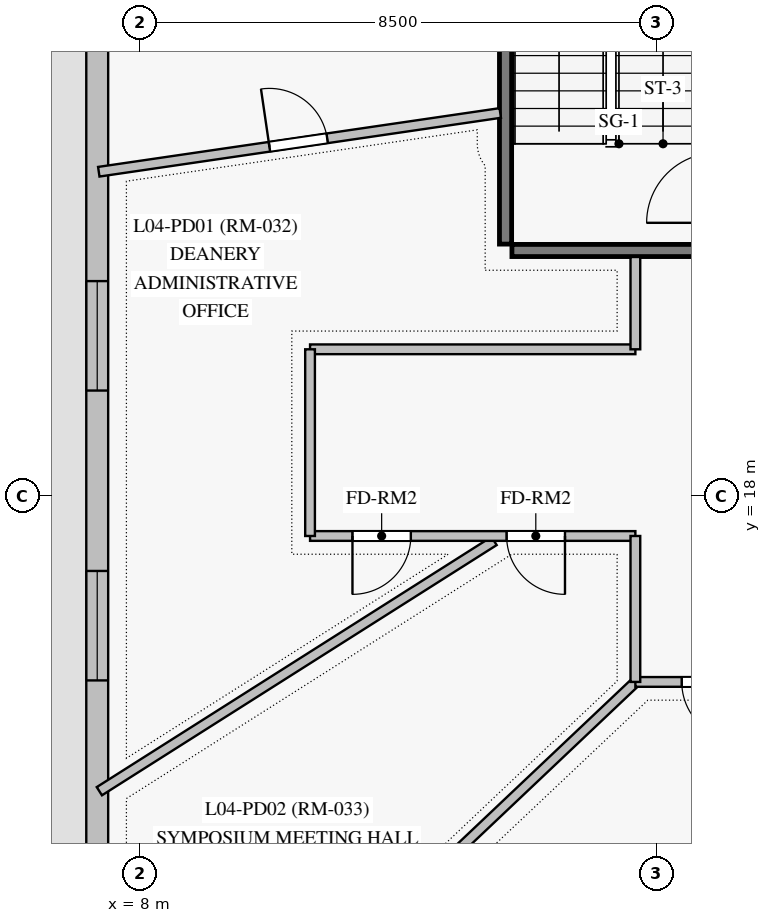
"""IFC4 building model, lengths in metres.
Left out: names, types, materials, properties, quantities, classifications, styles, units other than length and angle.
Written with IfcOpenShell. Run it as: python <this file> out.ifc"""

import sys

from ifc_helpers import new_model, si_unit, direction, frame, frame_2d, origin, origin_with_axes, place, context, subcontext, project, spatial, rectangle, extrude, source, transform, mapped, element, fill, save


model = new_model("IFC4")
c1 = context("Model", 3, precision=1e-05, world=origin(), true_north=direction((0.0, 1.0)))
c2 = subcontext(c1, "Body", "Model", "MODEL_VIEW")
j1 = project(units=[si_unit("LENGTHUNIT", "METRE"), si_unit("PLANEANGLEUNIT", "RADIAN")], contexts=[c1])
p1 = place(None, origin())
s1 = spatial("IfcSite", under=j1, at=p1, CompositionType="ELEMENT")
p2 = place(p1, origin())
s2 = spatial("IfcBuilding", under=s1, at=p2, CompositionType="ELEMENT")
p3 = place(p2, frame((0.0, 0.0, 18.0)))
s3 = spatial("IfcBuildingStorey", under=s2, at=p3, CompositionType="ELEMENT", Elevation=18.0)
p4 = place(p3, frame((7.3, 45.8, 0.0), z_axis=(0.0, 0.0, 1.0), x_axis=(0.0, -1.0, 0.0)))
e1 = element("IfcWall", 1, at=p4, inside=s3, PredefinedType="SOLIDWALL", context=c2, shape_type="SweptSolid", body=[
    extrude(rectangle(XDim=38.6, YDim=0.36, at=frame_2d((19.3, 0.0))), origin(), (0.0, 0.0, 1.0), 4.225),
])
p5 = place(p4, frame((0.817, 0.0, 0.85)))
e2 = element("IfcOpeningElement", 2, at=p5, cuts=e1, PredefinedType="OPENING", context=c2, shape_type="SweptSolid", body=[
    extrude(rectangle(XDim=1.8, YDim=2.2, at=frame_2d((0.9, 1.1))), frame((0.0, 0.19, 0.0), z_axis=(0.0, -1.0, 0.0), x_axis=(1.0, 0.0, 0.0)), (0.0, 0.0, 1.0), 0.38),
])
p6 = place(p4, frame((12.849, 0.0, 0.85)))
e3 = element("IfcOpeningElement", 3, at=p6, cuts=e1, PredefinedType="OPENING", context=c2, shape_type="SweptSolid", body=[
    extrude(rectangle(XDim=1.8, YDim=2.2, at=frame_2d((0.9, 1.1))), frame((0.0, 0.19, 0.0), z_axis=(0.0, -1.0, 0.0), x_axis=(1.0, 0.0, 0.0)), (0.0, 0.0, 1.0), 0.38),
])
p7 = place(p4, frame((18.439, 0.0, 0.85)))
e4 = element("IfcOpeningElement", 4, at=p7, cuts=e1, PredefinedType="OPENING", context=c2, shape_type="SweptSolid", body=[
    extrude(rectangle(XDim=1.8, YDim=2.2, at=frame_2d((0.9, 1.1))), frame((0.0, 0.19, 0.0), z_axis=(0.0, -1.0, 0.0), x_axis=(1.0, 0.0, 0.0)), (0.0, 0.0, 1.0), 0.38),
])
p8 = place(p4, frame((24.258, 0.0, 0.85)))
e5 = element("IfcOpeningElement", 5, at=p8, cuts=e1, PredefinedType="OPENING", context=c2, shape_type="SweptSolid", body=[
    extrude(rectangle(XDim=1.8, YDim=2.2, at=frame_2d((0.9, 1.1))), frame((0.0, 0.19, 0.0), z_axis=(0.0, -1.0, 0.0), x_axis=(1.0, 0.0, 0.0)), (0.0, 0.0, 1.0), 0.38),
])
p9 = place(p4, frame((29.025, 0.0, 0.85)))
e6 = element("IfcOpeningElement", 6, at=p9, cuts=e1, PredefinedType="OPENING", context=c2, shape_type="SweptSolid", body=[
    extrude(rectangle(XDim=1.8, YDim=2.2, at=frame_2d((0.9, 1.1))), frame((0.0, 0.19, 0.0), z_axis=(0.0, -1.0, 0.0), x_axis=(1.0, 0.0, 0.0)), (0.0, 0.0, 1.0), 0.38),
])
p10 = place(p4, frame((34.599, 0.0, 0.85)))
e7 = element("IfcOpeningElement", 7, at=p10, cuts=e1, PredefinedType="OPENING", context=c2, shape_type="SweptSolid", body=[
    extrude(rectangle(XDim=1.8, YDim=2.2, at=frame_2d((0.9, 1.1))), frame((0.0, 0.19, 0.0), z_axis=(0.0, -1.0, 0.0), x_axis=(1.0, 0.0, 0.0)), (0.0, 0.0, 1.0), 0.38),
])
p11 = place(p4, frame((5.908, 0.0, 0.0)))
e8 = element("IfcOpeningElement", 8, at=p11, cuts=e1, PredefinedType="OPENING", context=c2, shape_type="SweptSolid", body=[
    extrude(rectangle(XDim=1.05, YDim=2.12, at=frame_2d((0.525, 1.06))), frame((0.0, 0.19, 0.0), z_axis=(0.0, -1.0, 0.0), x_axis=(1.0, 0.0, 0.0)), (0.0, 0.0, 1.0), 0.38),
])
p12 = place(p3, frame((14.015, 22.15, 0.0), z_axis=(0.0, 0.0, 1.0), x_axis=(0.0, 1.0, 0.0)))
e9 = element("IfcWall", 9, at=p12, inside=s3, PredefinedType="SHEAR", context=c2, shape_type="SweptSolid", body=[
    extrude(rectangle(XDim=7.35, YDim=0.2, at=frame_2d((3.675, 0.0))), origin(), (0.0, 0.0, 1.0), 4.225),
])
p13 = place(p3, frame((14.12, 22.045, 0.0), z_axis=(0.0, 0.0, 1.0), x_axis=(1.0, 0.0, 0.0)))
e10 = element("IfcWall", 10, at=p13, inside=s3, PredefinedType="SHEAR", context=c2, shape_type="SweptSolid", body=[
    extrude(rectangle(XDim=3.26, YDim=0.2, at=frame_2d((1.63, 0.0))), origin(), (0.0, 0.0, 1.0), 4.225),
])
p14 = place(p3, frame((19.64, 14.868, 0.0), z_axis=(0.0, 0.0, 1.0), x_axis=(-0.602693961027, -0.797972423923, 0.0)))
e11 = element("IfcWall", 11, at=p14, inside=s3, PredefinedType="PARTITIONING", context=c2, shape_type="SweptSolid", body=[
    extrude(rectangle(XDim=11.817, YDim=0.16, at=frame_2d((5.909, 0.0))), origin(), (0.0, 0.0, 1.0), 2.725),
])
p15 = place(p14, frame((5.479, 0.0, 0.0)))
e12 = element("IfcOpeningElement", 12, at=p15, cuts=e11, PredefinedType="OPENING", context=c2, shape_type="SweptSolid", body=[
    extrude(rectangle(XDim=0.86, YDim=2.04, at=frame_2d((0.43, 1.02))), frame((0.0, 0.09, 0.0), z_axis=(0.0, -1.0, 0.0), x_axis=(1.0, 0.0, 0.0)), (0.0, 0.0, 1.0), 0.18),
])
p16 = place(p3, frame((16.176, 14.971, 0.0), z_axis=(0.0, 0.0, 1.0), x_axis=(-0.726215784898, -0.687466823755, 0.0)))
e13 = element("IfcWall", 13, at=p16, inside=s3, PredefinedType="PARTITIONING", context=c2, shape_type="SweptSolid", body=[
    extrude(rectangle(XDim=11.75, YDim=0.16, at=frame_2d((5.875, 0.0))), origin(), (0.0, 0.0, 1.0), 2.725),
])
p17 = place(p3, frame((21.056, 14.868, 0.0), z_axis=(0.0, 0.0, 1.0), x_axis=(-0.535331338358, -0.844642147996, 0.0)))
e14 = element("IfcWall", 14, at=p17, inside=s3, PredefinedType="PARTITIONING", context=c2, shape_type="SweptSolid", body=[
    extrude(rectangle(XDim=11.168, YDim=0.16, at=frame_2d((5.584, 0.0))), origin(), (0.0, 0.0, 1.0), 4.225),
])
p18 = place(p3, frame((13.826, 17.268, 0.0), z_axis=(0.0, 0.0, 1.0), x_axis=(-0.844566741784, -0.535450295239, 0.0)))
e15 = element("IfcWall", 15, at=p18, inside=s3, PredefinedType="PARTITIONING", context=c2, shape_type="SweptSolid", body=[
    extrude(rectangle(XDim=7.686, YDim=0.16, at=frame_2d((3.843, 0.0))), origin(), (0.0, 0.0, 1.0), 4.225),
])
p19 = place(p3, frame((7.326, 23.34, 0.0), z_axis=(0.0, 0.0, 1.0), x_axis=(0.989453263478, 0.144852474582, 0.0)))
e16 = element("IfcWall", 16, at=p19, inside=s3, PredefinedType="PARTITIONING", context=c2, shape_type="SweptSolid", body=[
    extrude(rectangle(XDim=6.673, YDim=0.16, at=frame_2d((3.336, 0.0))), origin(), (0.0, 0.0, 1.0), 4.225),
])
p20 = place(p19, frame((2.836, 0.0, 0.0)))
e17 = element("IfcOpeningElement", 17, at=p20, cuts=e16, PredefinedType="OPENING", context=c2, shape_type="SweptSolid", body=[
    extrude(rectangle(XDim=0.96, YDim=2.15, at=frame_2d((0.48, 1.075))), frame((0.0, 0.09, 0.0), z_axis=(0.0, -1.0, 0.0), x_axis=(1.0, 0.0, 0.0)), (0.0, 0.0, 1.0), 0.18),
])
p21 = place(p3, frame((16.15, 17.35, 0.0), z_axis=(0.0, 0.0, 1.0), x_axis=(-1.0, 0.0, 0.0)))
e18 = element("IfcWall", 18, at=p21, inside=s3, PredefinedType="PARTITIONING", context=c2, shape_type="SweptSolid", body=[
    extrude(rectangle(XDim=5.35, YDim=0.16, at=frame_2d((2.675, 0.0))), origin(), (0.0, 0.0, 1.0), 4.225),
])
p22 = place(p21, frame((3.692, 0.0, 0.0)))
e19 = element("IfcOpeningElement", 19, at=p22, cuts=e18, PredefinedType="OPENING", context=c2, shape_type="SweptSolid", body=[
    extrude(rectangle(XDim=0.96, YDim=2.15, at=frame_2d((0.48, 1.075))), frame((0.0, 0.09, 0.0), z_axis=(0.0, -1.0, 0.0), x_axis=(1.0, 0.0, 0.0)), (0.0, 0.0, 1.0), 0.18),
])
p23 = place(p21, frame((1.157, 0.0, 0.0)))
e20 = element("IfcOpeningElement", 20, at=p23, cuts=e18, PredefinedType="OPENING", context=c2, shape_type="SweptSolid", body=[
    extrude(rectangle(XDim=0.96, YDim=2.15, at=frame_2d((0.48, 1.075))), frame((0.0, 0.09, 0.0), z_axis=(0.0, -1.0, 0.0), x_axis=(1.0, 0.0, 0.0)), (0.0, 0.0, 1.0), 0.18),
])
p24 = place(p3, frame((10.8, 20.42, 0.0), z_axis=(0.0, 0.0, 1.0), x_axis=(1.0, 0.0, 0.0)))
e21 = element("IfcWall", 21, at=p24, inside=s3, PredefinedType="PARTITIONING", context=c2, shape_type="SweptSolid", body=[
    extrude(rectangle(XDim=5.35, YDim=0.16, at=frame_2d((2.675, 0.0))), origin(), (0.0, 0.0, 1.0), 2.725),
])
p25 = place(p3, frame((21.2, 14.95, 0.0), z_axis=(0.0, 0.0, 1.0), x_axis=(-1.0, 0.0, 0.0)))
e22 = element("IfcWall", 22, at=p25, inside=s3, PredefinedType="PARTITIONING", context=c2, shape_type="SweptSolid", body=[
    extrude(rectangle(XDim=5.05, YDim=0.16, at=frame_2d((2.525, 0.0))), origin(), (0.0, 0.0, 1.0), 4.225),
])
p26 = place(p25, frame((2.19, 0.0, 0.0)))
e23 = element("IfcOpeningElement", 23, at=p26, cuts=e22, PredefinedType="OPENING", context=c2, shape_type="SweptSolid", body=[
    extrude(rectangle(XDim=0.96, YDim=2.15, at=frame_2d((0.48, 1.075))), frame((0.0, 0.09, 0.0), z_axis=(0.0, -1.0, 0.0), x_axis=(1.0, 0.0, 0.0)), (0.0, 0.0, 1.0), 0.18),
])
p27 = place(p25, frame((3.327, 0.0, 0.0)))
e24 = element("IfcOpeningElement", 24, at=p27, cuts=e22, PredefinedType="OPENING", context=c2, shape_type="SweptSolid", body=[
    extrude(rectangle(XDim=0.96, YDim=2.15, at=frame_2d((0.48, 1.075))), frame((0.0, 0.09, 0.0), z_axis=(0.0, -1.0, 0.0), x_axis=(1.0, 0.0, 0.0)), (0.0, 0.0, 1.0), 0.18),
])
p28 = place(p3, frame((10.8, 17.35, 0.0), z_axis=(0.0, 0.0, 1.0), x_axis=(0.0, 1.0, 0.0)))
e25 = element("IfcWall", 25, at=p28, inside=s3, PredefinedType="PARTITIONING", context=c2, shape_type="SweptSolid", body=[
    extrude(rectangle(XDim=3.07, YDim=0.16, at=frame_2d((1.535, 0.0))), origin(), (0.0, 0.0, 1.0), 4.225),
])
p29 = place(p3, frame((16.15, 14.95, 0.0), z_axis=(0.0, 0.0, 1.0), x_axis=(0.0, 1.0, 0.0)))
e26 = element("IfcWall", 26, at=p29, inside=s3, PredefinedType="PARTITIONING", context=c2, shape_type="SweptSolid", body=[
    extrude(rectangle(XDim=2.4, YDim=0.16, at=frame_2d((1.2, 0.0))), origin(), (0.0, 0.0, 1.0), 2.725),
])
p30 = place(p3, frame((16.15, 20.42, 0.0), z_axis=(0.0, 0.0, 1.0), x_axis=(0.0, 1.0, 0.0)))
e27 = element("IfcWall", 27, at=p30, inside=s3, PredefinedType="PARTITIONING", context=c2, shape_type="SweptSolid", body=[
    extrude(rectangle(XDim=1.518, YDim=0.16, at=frame_2d((0.759, 0.0))), origin(), (0.0, 0.0, 1.0), 4.225),
])
m1 = source(origin_with_axes(), c2, "Body", "SweptSolid", [
    extrude(rectangle(XDim=1.8, YDim=2.2, at=frame_2d((0.9, 1.1))), frame((0.0, 0.03, 0.0), z_axis=(0.0, -1.0, 0.0), x_axis=(1.0, 0.0, 0.0)), (0.0, 0.0, 1.0), 0.06),
])
p31 = place(p8, origin())
e28 = element("IfcWindow", 28, at=p31, inside=s3, PartitioningType="SINGLE_PANEL", PredefinedType="WINDOW", context=c2, shape_type="MappedRepresentation", body=[
    mapped(m1, transform((0.0, 0.0, 0.0), scale=1.0)),
])
fill(e5, e28)
p32 = place(p9, origin())
e29 = element("IfcWindow", 29, at=p32, inside=s3, PartitioningType="SINGLE_PANEL", PredefinedType="WINDOW", context=c2, shape_type="MappedRepresentation", body=[
    mapped(m1, transform((0.0, 0.0, 0.0), scale=1.0)),
])
fill(e6, e29)
m2 = source(origin_with_axes(), c2, "Body", "SweptSolid", [
    extrude(rectangle(XDim=0.96, YDim=2.15, at=frame_2d((0.48, 1.075))), frame((0.0, 0.025, 0.0), z_axis=(0.0, -1.0, 0.0), x_axis=(1.0, 0.0, 0.0)), (0.0, 0.0, 1.0), 0.05),
])
p33 = place(p22, origin())
e30 = element("IfcDoor", 30, at=p33, inside=s3, OperationType="SINGLE_SWING_RIGHT", PredefinedType="DOOR", context=c2, shape_type="MappedRepresentation", body=[
    mapped(m2, transform((0.0, 0.0, 0.0), scale=1.0)),
])
fill(e19, e30)
p34 = place(p23, origin())
e31 = element("IfcDoor", 31, at=p34, inside=s3, OperationType="SINGLE_SWING_LEFT", PredefinedType="DOOR", context=c2, shape_type="MappedRepresentation", body=[
    mapped(m2, transform((0.0, 0.0, 0.0), scale=1.0)),
])
fill(e20, e31)
p35 = place(p27, origin())
e32 = element("IfcDoor", 32, at=p35, inside=s3, OperationType="SINGLE_SWING_LEFT", PredefinedType="DOOR", context=c2, shape_type="MappedRepresentation", body=[
    mapped(m2, transform((0.0, 0.0, 0.0), scale=1.0)),
])
fill(e24, e32)
p36 = place(p20, origin())
e33 = element("IfcDoor", 33, at=p36, inside=s3, OperationType="SINGLE_SWING_LEFT", PredefinedType="DOOR", context=c2, shape_type="MappedRepresentation", body=[
    mapped(m2, transform((0.0, 0.0, 0.0), scale=1.0)),
])
fill(e17, e33)
save(model, sys.argv[1])
